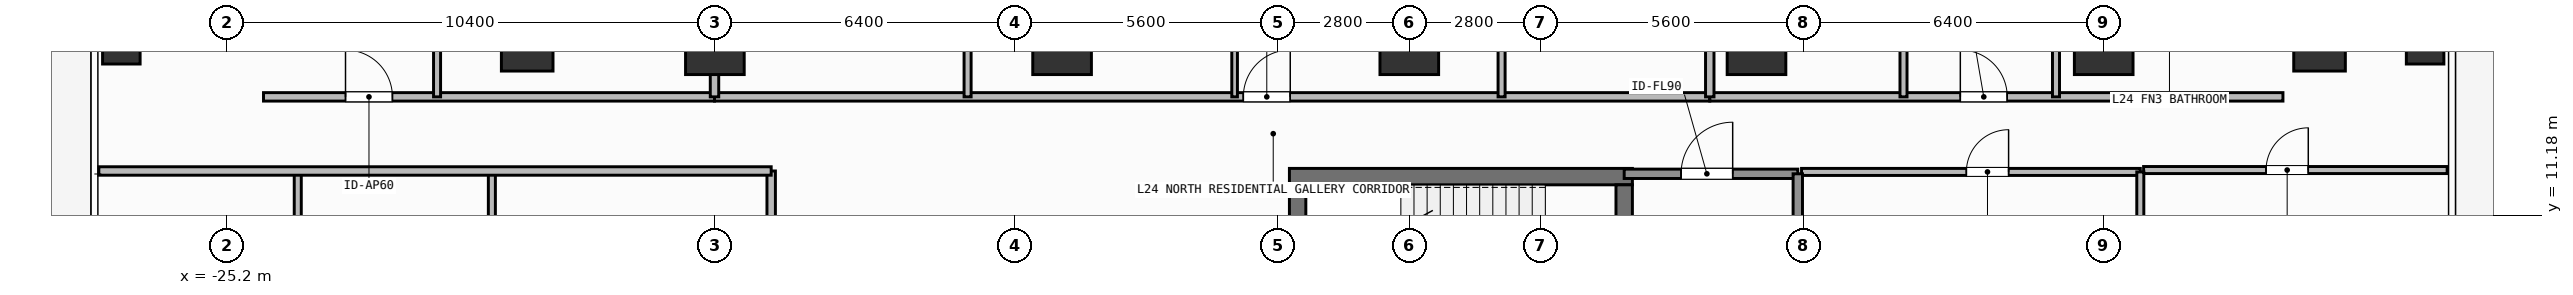
"""IFC4 building model, lengths in metres.
Left out: names, types, materials, properties, quantities, classifications, styles, units other than length and angle.
Written with IfcOpenShell. Run it as: python <this file> out.ifc"""

import sys

from ifc_helpers import new_model, si_unit, direction, frame, frame_2d, origin, origin_2d, place, context, subcontext, project, spatial, rectangle, hollow_rectangle, extrude, element, fill, save


model = new_model("IFC4")
c1 = context("Model", 3, precision=1e-05, world=origin(), true_north=direction((0.0, 1.0)))
c2 = subcontext(c1, "Body", "Model", "MODEL_VIEW")
j1 = project(units=[si_unit("LENGTHUNIT", "METRE"), si_unit("PLANEANGLEUNIT", "RADIAN")], contexts=[c1])
p1 = place(None, origin())
s1 = spatial("IfcSite", under=j1, at=p1, CompositionType="ELEMENT")
p2 = place(p1, origin())
s2 = spatial("IfcBuilding", under=s1, at=p2, CompositionType="ELEMENT")
p3 = place(p2, frame((0.0, 0.0, 96.9)))
s3 = spatial("IfcBuildingStorey", under=s2, at=p3, CompositionType="ELEMENT", Elevation=96.9)
p4 = place(p3, frame((-2.555, 12.0, 0.0), z_axis=(0.0, 0.0, 1.0), x_axis=(1.0, 0.0, 0.0)))
e1 = element("IfcWall", 1, at=p4, inside=s3, PredefinedType="SHEAR", context=c2, shape_type="SweptSolid", body=[
    extrude(rectangle(XDim=7.31, YDim=0.35, at=frame_2d((3.655, 0.0))), origin(), (0.0, 0.0, 1.0), 3.9),
])
p5 = place(p3, frame((-2.38, 8.9, 0.0), z_axis=(0.0, 0.0, 1.0), x_axis=(0.0, 1.0, 0.0)))
e2 = element("IfcWall", 2, at=p5, inside=s3, PredefinedType="SHEAR", context=c2, shape_type="SweptSolid", body=[
    extrude(rectangle(XDim=2.925, YDim=0.35, at=frame_2d((1.462, 0.0))), origin(), (0.0, 0.0, 1.0), 3.9),
])
p6 = place(p3, frame((4.58, 11.825, 0.0), z_axis=(0.0, 0.0, 1.0), x_axis=(0.0, -1.0, 0.0)))
e3 = element("IfcWall", 3, at=p6, inside=s3, PredefinedType="SHEAR", context=c2, shape_type="SweptSolid", body=[
    extrude(rectangle(XDim=2.925, YDim=0.35, at=frame_2d((1.462, 0.0))), origin(), (0.0, 0.0, 1.0), 3.9),
])
p7 = place(p6, frame((0.913, 0.0, 0.0)))
e4 = element("IfcOpeningElement", 4, at=p7, cuts=e3, PredefinedType="OPENING", context=c2, shape_type="SweptSolid", body=[
    extrude(rectangle(XDim=1.1, YDim=2.15, at=frame_2d((0.55, 1.075))), frame((0.0, 0.185, 0.0), z_axis=(0.0, -1.0, 0.0), x_axis=(1.0, 0.0, 0.0)), (0.0, 0.0, 1.0), 0.37),
])
for number, where, z_axis, x_axis in (
    (5, (-14.8, 14.8, 0.0), (0.0, 0.0, 1.0), (1.0, 0.0, 0.0)),
    (6, (-7.4, 14.8, 0.0), (0.0, 0.0, 1.0), (1.0, 0.0, 0.0)),
    (7, (0.0, 14.8, 0.0), (0.0, 0.0, 1.0), (1.0, 0.0, 0.0)),
    (8, (7.4, 14.8, 0.0), (0.0, 0.0, 1.0), (1.0, 0.0, 0.0)),
    (9, (14.8, 14.8, 0.0), (0.0, 0.0, 1.0), (1.0, 0.0, 0.0)),
):
    element("IfcColumn", number, at=place(p3, frame(where, z_axis=z_axis, x_axis=x_axis)), inside=s3, PredefinedType="COLUMN", context=c2, shape_type="SweptSolid", body=[
        extrude(rectangle(XDim=1.25, YDim=1.25, at=origin_2d()), origin(), (0.0, 0.0, 1.0), 3.9),
    ])
for number, where, z_axis, x_axis in (
    (10, (-18.8, 14.8, 0.0), (0.0, 0.0, 1.0), (1.0, 0.0, 0.0)),
    (11, (19.4, 14.8, 0.0), (0.0, 0.0, 1.0), (1.0, 0.0, 0.0)),
):
    element("IfcColumn", number, at=place(p3, frame(where, z_axis=z_axis, x_axis=x_axis)), inside=s3, PredefinedType="COLUMN", context=c2, shape_type="SweptSolid", body=[
        extrude(rectangle(XDim=1.1, YDim=1.1, at=origin_2d()), origin(), (0.0, 0.0, 1.0), 3.9),
    ])
for number, where, z_axis, x_axis in (
    (12, (-27.45, 14.8, 0.0), (0.0, 0.0, 1.0), (1.0, 0.0, 0.0)),
    (13, (21.65, 14.8, 0.0), (0.0, 0.0, 1.0), (1.0, 0.0, 0.0)),
):
    element("IfcColumn", number, at=place(p3, frame(where, z_axis=z_axis, x_axis=x_axis)), inside=s3, PredefinedType="COLUMN", context=c2, shape_type="SweptSolid", body=[
        extrude(hollow_rectangle(XDim=0.8, YDim=0.8, WallThickness=0.036, at=origin_2d()), origin(), (0.0, 0.0, 1.0), 3.9),
    ])
p8 = place(p3, frame((4.58, 12.06, 0.0), z_axis=(0.0, 0.0, 1.0), x_axis=(1.0, 0.0, 0.0)))
e14 = element("IfcWall", 14, at=p8, inside=s3, PredefinedType="SOLIDWALL", context=c2, shape_type="SweptSolid", body=[
    extrude(rectangle(XDim=3.7, YDim=0.2, at=frame_2d((1.85, 0.0))), origin(), (0.0, 0.0, 1.0), 3.68),
])
p9 = place(p8, frame((1.212, 0.0, 0.0)))
e15 = element("IfcOpeningElement", 15, at=p9, cuts=e14, PredefinedType="OPENING", context=c2, shape_type="SweptSolid", body=[
    extrude(rectangle(XDim=1.1, YDim=2.15, at=frame_2d((0.55, 1.075))), frame((0.0, 0.11, 0.0), z_axis=(0.0, -1.0, 0.0), x_axis=(1.0, 0.0, 0.0)), (0.0, 0.0, 1.0), 0.22),
])
p10 = place(p3, frame((8.36, 12.1, 0.0), z_axis=(0.0, 0.0, 1.0), x_axis=(1.0, 0.0, 0.0)))
e16 = element("IfcWall", 16, at=p10, inside=s3, PredefinedType="PARTITIONING", context=c2, shape_type="SweptSolid", body=[
    extrude(rectangle(XDim=7.22, YDim=0.15, at=frame_2d((3.61, 0.0))), origin(), (0.0, 0.0, 1.0), 3.68),
])
p11 = place(p10, frame((3.513, 0.0, 0.0)))
e17 = element("IfcOpeningElement", 17, at=p11, cuts=e16, PredefinedType="OPENING", context=c2, shape_type="SweptSolid", body=[
    extrude(rectangle(XDim=0.9, YDim=2.1, at=frame_2d((0.45, 1.05))), frame((0.0, 0.085, 0.0), z_axis=(0.0, -1.0, 0.0), x_axis=(1.0, 0.0, 0.0)), (0.0, 0.0, 1.0), 0.17),
])
p12 = place(p3, frame((-24.42, 13.7, 0.0), z_axis=(0.0, 0.0, 1.0), x_axis=(1.0, 0.0, 0.0)))
e18 = element("IfcWall", 18, at=p12, inside=s3, PredefinedType="PARTITIONING", context=c2, shape_type="SweptSolid", body=[
    extrude(rectangle(XDim=9.612, YDim=0.18, at=frame_2d((4.806, 0.0))), origin(), (0.0, 0.0, 1.0), 3.68),
])
p13 = place(p12, frame((1.748, 0.0, 0.0)))
e19 = element("IfcOpeningElement", 19, at=p13, cuts=e18, PredefinedType="OPENING", context=c2, shape_type="SweptSolid", body=[
    extrude(rectangle(XDim=1.0, YDim=2.2, at=frame_2d((0.5, 1.1))), frame((0.0, 0.1, 0.0), z_axis=(0.0, -1.0, 0.0), x_axis=(1.0, 0.0, 0.0)), (0.0, 0.0, 1.0), 0.2),
])
p14 = place(p3, frame((-20.721, 13.7, 0.0), z_axis=(0.0, 0.0, 1.0), x_axis=(0.0, 1.0, 0.0)))
e20 = element("IfcWall", 20, at=p14, inside=s3, PredefinedType="PARTITIONING", context=c2, shape_type="SweptSolid", body=[
    extrude(rectangle(XDim=4.651, YDim=0.15, at=frame_2d((2.326, 0.0))), origin(), (0.0, 0.0, 1.0), 3.68),
])
p15 = place(p14, frame((1.9, 0.0, 0.0)))
e21 = element("IfcOpeningElement", 21, at=p15, cuts=e20, PredefinedType="OPENING", context=c2, shape_type="SweptSolid", body=[
    extrude(rectangle(XDim=0.85, YDim=2.1, at=frame_2d((0.425, 1.05))), frame((0.0, 0.085, 0.0), z_axis=(0.0, -1.0, 0.0), x_axis=(1.0, 0.0, 0.0)), (0.0, 0.0, 1.0), 0.17),
])
p16 = place(p3, frame((-14.808, 13.7, 0.0), z_axis=(0.0, 0.0, 1.0), x_axis=(1.0, 0.0, 0.0)))
e22 = element("IfcWall", 22, at=p16, inside=s3, PredefinedType="PARTITIONING", context=c2, shape_type="SweptSolid", body=[
    extrude(rectangle(XDim=21.212, YDim=0.18, at=frame_2d((10.606, 0.0))), origin(), (0.0, 0.0, 1.0), 3.68),
])
p17 = place(p16, frame((11.271, 0.0, 0.0)))
e23 = element("IfcOpeningElement", 23, at=p17, cuts=e22, PredefinedType="OPENING", context=c2, shape_type="SweptSolid", body=[
    extrude(rectangle(XDim=1.0, YDim=2.2, at=frame_2d((0.5, 1.1))), frame((0.0, 0.1, 0.0), z_axis=(0.0, -1.0, 0.0), x_axis=(1.0, 0.0, 0.0)), (0.0, 0.0, 1.0), 0.2),
])
p18 = place(p3, frame((-3.723, 13.7, 0.0), z_axis=(0.0, 0.0, 1.0), x_axis=(0.0, 1.0, 0.0)))
e24 = element("IfcWall", 24, at=p18, inside=s3, PredefinedType="PARTITIONING", context=c2, shape_type="SweptSolid", body=[
    extrude(rectangle(XDim=12.89, YDim=0.12, at=frame_2d((6.445, 0.0))), origin(), (0.0, 0.0, 1.0), 3.68),
])
p19 = place(p18, frame((5.905, 0.0, 0.0)))
e25 = element("IfcOpeningElement", 25, at=p19, cuts=e24, PredefinedType="OPENING", context=c2, shape_type="SweptSolid", body=[
    extrude(rectangle(XDim=0.9, YDim=2.1, at=frame_2d((0.45, 1.05))), frame((0.0, 0.07, 0.0), z_axis=(0.0, -1.0, 0.0), x_axis=(1.0, 0.0, 0.0)), (0.0, 0.0, 1.0), 0.14),
])
p20 = place(p3, frame((-9.414, 13.7, 0.0), z_axis=(0.0, 0.0, 1.0), x_axis=(0.0, 1.0, 0.0)))
e26 = element("IfcWall", 26, at=p20, inside=s3, PredefinedType="PARTITIONING", context=c2, shape_type="SweptSolid", body=[
    extrude(rectangle(XDim=6.303, YDim=0.15, at=frame_2d((3.151, 0.0))), origin(), (0.0, 0.0, 1.0), 3.68),
])
p21 = place(p20, frame((2.638, 0.0, 0.0)))
e27 = element("IfcOpeningElement", 27, at=p21, cuts=e26, PredefinedType="OPENING", context=c2, shape_type="SweptSolid", body=[
    extrude(rectangle(XDim=0.85, YDim=2.1, at=frame_2d((0.425, 1.05))), frame((0.0, 0.085, 0.0), z_axis=(0.0, -1.0, 0.0), x_axis=(1.0, 0.0, 0.0)), (0.0, 0.0, 1.0), 0.17),
])
p22 = place(p3, frame((1.967, 13.7, 0.0), z_axis=(0.0, 0.0, 1.0), x_axis=(0.0, 1.0, 0.0)))
e28 = element("IfcWall", 28, at=p22, inside=s3, PredefinedType="PARTITIONING", context=c2, shape_type="SweptSolid", body=[
    extrude(rectangle(XDim=3.48, YDim=0.15, at=frame_2d((1.74, 0.0))), origin(), (0.0, 0.0, 1.0), 3.68),
])
p23 = place(p22, frame((1.937, 0.0, 0.0)))
e29 = element("IfcOpeningElement", 29, at=p23, cuts=e28, PredefinedType="OPENING", context=c2, shape_type="SweptSolid", body=[
    extrude(rectangle(XDim=0.85, YDim=2.1, at=frame_2d((0.425, 1.05))), frame((0.0, 0.085, 0.0), z_axis=(0.0, -1.0, 0.0), x_axis=(1.0, 0.0, 0.0)), (0.0, 0.0, 1.0), 0.17),
])
p24 = place(p3, frame((6.404, 13.7, 0.0), z_axis=(0.0, 0.0, 1.0), x_axis=(1.0, 0.0, 0.0)))
e30 = element("IfcWall", 30, at=p24, inside=s3, PredefinedType="PARTITIONING", context=c2, shape_type="SweptSolid", body=[
    extrude(rectangle(XDim=12.216, YDim=0.18, at=frame_2d((6.108, 0.0))), origin(), (0.0, 0.0, 1.0), 3.68),
])
p25 = place(p24, frame((5.34, 0.0, 0.0)))
e31 = element("IfcOpeningElement", 31, at=p25, cuts=e30, PredefinedType="OPENING", context=c2, shape_type="SweptSolid", body=[
    extrude(rectangle(XDim=1.0, YDim=2.2, at=frame_2d((0.5, 1.1))), frame((0.0, 0.1, 0.0), z_axis=(0.0, -1.0, 0.0), x_axis=(1.0, 0.0, 0.0)), (0.0, 0.0, 1.0), 0.2),
])
p26 = place(p3, frame((10.533, 13.7, 0.0), z_axis=(0.0, 0.0, 1.0), x_axis=(0.0, 1.0, 0.0)))
e32 = element("IfcWall", 32, at=p26, inside=s3, PredefinedType="PARTITIONING", context=c2, shape_type="SweptSolid", body=[
    extrude(rectangle(XDim=7.476, YDim=0.15, at=frame_2d((3.738, 0.0))), origin(), (0.0, 0.0, 1.0), 3.68),
])
p27 = place(p26, frame((3.313, 0.0, 0.0)))
e33 = element("IfcOpeningElement", 33, at=p27, cuts=e32, PredefinedType="OPENING", context=c2, shape_type="SweptSolid", body=[
    extrude(rectangle(XDim=0.85, YDim=2.1, at=frame_2d((0.425, 1.05))), frame((0.0, 0.085, 0.0), z_axis=(0.0, -1.0, 0.0), x_axis=(1.0, 0.0, 0.0)), (0.0, 0.0, 1.0), 0.17),
])
p28 = place(p3, frame((13.783, 13.7, 0.0), z_axis=(0.0, 0.0, 1.0), x_axis=(0.0, 1.0, 0.0)))
e34 = element("IfcWall", 34, at=p28, inside=s3, PredefinedType="PARTITIONING", context=c2, shape_type="SweptSolid", body=[
    extrude(rectangle(XDim=3.48, YDim=0.15, at=frame_2d((1.74, 0.0))), origin(), (0.0, 0.0, 1.0), 3.68),
])
p29 = place(p28, frame((1.937, 0.0, 0.0)))
e35 = element("IfcOpeningElement", 35, at=p29, cuts=e34, PredefinedType="OPENING", context=c2, shape_type="SweptSolid", body=[
    extrude(rectangle(XDim=0.85, YDim=2.1, at=frame_2d((0.425, 1.05))), frame((0.0, 0.085, 0.0), z_axis=(0.0, -1.0, 0.0), x_axis=(1.0, 0.0, 0.0)), (0.0, 0.0, 1.0), 0.17),
])
p30 = place(p3, frame((-13.6, -1.6, 0.0), z_axis=(0.0, 0.0, 1.0), x_axis=(0.0, 1.0, 0.0)))
e36 = element("IfcWall", 36, at=p30, inside=s3, PredefinedType="PARTITIONING", context=c2, shape_type="SweptSolid", body=[
    extrude(rectangle(XDim=13.72, YDim=0.18, at=frame_2d((6.86, 0.0))), origin(), (0.0, 0.0, 1.0), 3.68),
])
p31 = place(p30, frame((6.989, 0.0, 0.0)))
e37 = element("IfcOpeningElement", 37, at=p31, cuts=e36, PredefinedType="OPENING", context=c2, shape_type="SweptSolid", body=[
    extrude(rectangle(XDim=1.0, YDim=2.2, at=frame_2d((0.5, 1.1))), frame((0.0, 0.1, 0.0), z_axis=(0.0, -1.0, 0.0), x_axis=(1.0, 0.0, 0.0)), (0.0, 0.0, 1.0), 0.2),
])
p32 = place(p3, frame((15.65, 12.14, 0.0), z_axis=(0.0, 0.0, 1.0), x_axis=(1.0, 0.0, 0.0)))
e38 = element("IfcWall", 38, at=p32, inside=s3, PredefinedType="PARTITIONING", context=c2, shape_type="SweptSolid", body=[
    extrude(rectangle(XDim=6.47, YDim=0.15, at=frame_2d((3.235, 0.0))), origin(), (0.0, 0.0, 1.0), 3.68),
])
p33 = place(p32, frame((2.61, 0.0, 0.0)))
e39 = element("IfcOpeningElement", 39, at=p33, cuts=e38, PredefinedType="OPENING", context=c2, shape_type="SweptSolid", body=[
    extrude(rectangle(XDim=0.9, YDim=2.1, at=frame_2d((0.45, 1.05))), frame((0.0, 0.085, 0.0), z_axis=(0.0, -1.0, 0.0), x_axis=(1.0, 0.0, 0.0)), (0.0, 0.0, 1.0), 0.17),
])
p34 = place(p3, frame((8.28, 8.875, 0.0), z_axis=(0.0, 0.0, 1.0), x_axis=(0.0, 1.0, 0.0)))
e40 = element("IfcWall", 40, at=p34, inside=s3, PredefinedType="SOLIDWALL", context=c2, shape_type="SweptSolid", body=[
    extrude(rectangle(XDim=3.185, YDim=0.2, at=frame_2d((1.593, 0.0))), origin(), (0.0, 0.0, 1.0), 3.68),
])
p35 = place(p3, frame((15.58, 5.85, 0.0), z_axis=(0.0, 0.0, 1.0), x_axis=(0.0, 1.0, 0.0)))
e41 = element("IfcWall", 41, at=p35, inside=s3, PredefinedType="PARTITIONING", context=c2, shape_type="SweptSolid", body=[
    extrude(rectangle(XDim=6.25, YDim=0.15, at=frame_2d((3.125, 0.0))), origin(), (0.0, 0.0, 1.0), 3.68),
])
p36 = place(p3, frame((-14.808, 13.7, 0.0), z_axis=(0.0, 0.0, 1.0), x_axis=(0.0, 1.0, 0.0)))
e42 = element("IfcWall", 42, at=p36, inside=s3, PredefinedType="PARTITIONING", context=c2, shape_type="SweptSolid", body=[
    extrude(rectangle(XDim=17.13, YDim=0.18, at=frame_2d((8.565, 0.0))), origin(), (0.0, 0.0, 1.0), 3.082),
])
p37 = place(p3, frame((6.404, 13.7, 0.0), z_axis=(0.0, 0.0, 1.0), x_axis=(0.0, 1.0, 0.0)))
e43 = element("IfcWall", 43, at=p37, inside=s3, PredefinedType="PARTITIONING", context=c2, shape_type="SweptSolid", body=[
    extrude(rectangle(XDim=17.13, YDim=0.18, at=frame_2d((8.565, 0.0))), origin(), (0.0, 0.0, 1.0), 3.68),
])
for number, where, z_axis, x_axis in (
    (44, (-19.553, 9.32, 0.0), (0.0, 0.0, 1.0), (0.0, 1.0, 0.0)),
    (45, (-23.69, 9.32, 0.0), (0.0, 0.0, 1.0), (0.0, 1.0, 0.0)),
):
    element("IfcWall", number, at=place(p3, frame(where, z_axis=z_axis, x_axis=x_axis)), inside=s3, PredefinedType="PARTITIONING", context=c2, shape_type="SweptSolid", body=[
        extrude(rectangle(XDim=2.8, YDim=0.15, at=frame_2d((1.4, 0.0))), origin(), (0.0, 0.0, 1.0), 3.68),
    ])
p38 = place(p3, frame((-27.93, 12.12, 0.0), z_axis=(0.0, 0.0, 1.0), x_axis=(1.0, 0.0, 0.0)))
e46 = element("IfcWall", 46, at=p38, inside=s3, PredefinedType="PARTITIONING", context=c2, shape_type="SweptSolid", body=[
    extrude(rectangle(XDim=14.33, YDim=0.18, at=frame_2d((7.165, 0.0))), origin(), (0.0, 0.0, 1.0), 3.68),
])
p39 = place(p9, origin())
e47 = element("IfcDoor", 47, at=p39, inside=s3, OperationType="SINGLE_SWING_RIGHT", PredefinedType="DOOR", context=c2, shape_type="SweptSolid", body=[
    extrude(rectangle(XDim=1.1, YDim=2.15, at=frame_2d((0.55, 1.075))), frame((0.0, 0.025, 0.0), z_axis=(0.0, -1.0, 0.0), x_axis=(1.0, 0.0, 0.0)), (0.0, 0.0, 1.0), 0.05),
])
fill(e15, e47)
p40 = place(p11, origin())
e48 = element("IfcDoor", 48, at=p40, inside=s3, OperationType="SINGLE_SWING_RIGHT", PredefinedType="DOOR", context=c2, shape_type="SweptSolid", body=[
    extrude(rectangle(XDim=0.9, YDim=2.1, at=frame_2d((0.45, 1.05))), frame((0.0, 0.025, 0.0), z_axis=(0.0, -1.0, 0.0), x_axis=(1.0, 0.0, 0.0)), (0.0, 0.0, 1.0), 0.05),
])
fill(e17, e48)
p41 = place(p13, origin())
e49 = element("IfcDoor", 49, at=p41, inside=s3, OperationType="SINGLE_SWING_LEFT", PredefinedType="DOOR", context=c2, shape_type="SweptSolid", body=[
    extrude(rectangle(XDim=1.0, YDim=2.2, at=frame_2d((0.5, 1.1))), frame((0.0, 0.025, 0.0), z_axis=(0.0, -1.0, 0.0), x_axis=(1.0, 0.0, 0.0)), (0.0, 0.0, 1.0), 0.05),
])
fill(e19, e49)
p42 = place(p17, origin())
e50 = element("IfcDoor", 50, at=p42, inside=s3, OperationType="SINGLE_SWING_RIGHT", PredefinedType="DOOR", context=c2, shape_type="SweptSolid", body=[
    extrude(rectangle(XDim=1.0, YDim=2.2, at=frame_2d((0.5, 1.1))), frame((0.0, 0.025, 0.0), z_axis=(0.0, -1.0, 0.0), x_axis=(1.0, 0.0, 0.0)), (0.0, 0.0, 1.0), 0.05),
])
fill(e23, e50)
p43 = place(p25, origin())
e51 = element("IfcDoor", 51, at=p43, inside=s3, OperationType="SINGLE_SWING_LEFT", PredefinedType="DOOR", context=c2, shape_type="SweptSolid", body=[
    extrude(rectangle(XDim=1.0, YDim=2.2, at=frame_2d((0.5, 1.1))), frame((0.0, 0.025, 0.0), z_axis=(0.0, -1.0, 0.0), x_axis=(1.0, 0.0, 0.0)), (0.0, 0.0, 1.0), 0.05),
])
fill(e31, e51)
p44 = place(p33, origin())
e52 = element("IfcDoor", 52, at=p44, inside=s3, OperationType="SINGLE_SWING_RIGHT", PredefinedType="DOOR", context=c2, shape_type="SweptSolid", body=[
    extrude(rectangle(XDim=0.9, YDim=2.1, at=frame_2d((0.45, 1.05))), frame((0.0, 0.025, 0.0), z_axis=(0.0, -1.0, 0.0), x_axis=(1.0, 0.0, 0.0)), (0.0, 0.0, 1.0), 0.05),
])
fill(e39, e52)
save(model, sys.argv[1])
